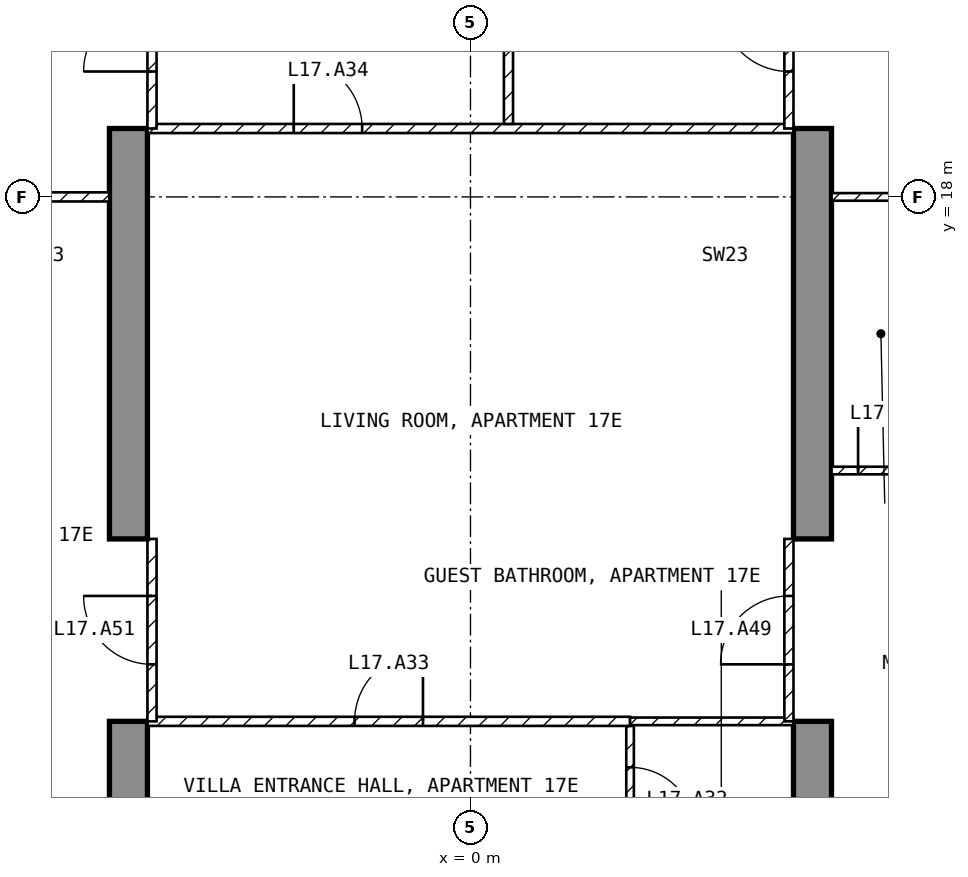
"""IFC4 building model, lengths in metres.
Left out: names, types, materials, properties, quantities, classifications, styles, units other than length and angle.
Written with IfcOpenShell. Run it as: python <this file> out.ifc"""

import sys

from ifc_helpers import new_model, si_unit, direction, frame, frame_2d, origin, place, context, subcontext, project, spatial, polyline, rectangle, outline, extrude, element, fill, save


model = new_model("IFC4")
c1 = context("Model", 3, precision=1e-05, world=origin(), true_north=direction((0.0, 1.0)))
c2 = subcontext(c1, "Body", "Model", "MODEL_VIEW")
j1 = project(units=[si_unit("LENGTHUNIT", "METRE"), si_unit("PLANEANGLEUNIT", "RADIAN")], contexts=[c1])
p1 = place(None, origin())
s1 = spatial("IfcSite", under=j1, at=p1, CompositionType="ELEMENT")
p2 = place(p1, origin())
s2 = spatial("IfcBuilding", under=s1, at=p2, CompositionType="ELEMENT")
p3 = place(p2, frame((0.0, 0.0, 78.5)))
s3 = spatial("IfcBuildingStorey", under=s2, at=p3, CompositionType="ELEMENT", Elevation=78.5)
for number, where, z_axis, x_axis in (
    (1, (-4.75, 9.0, -0.25), (1.0, 0.0, 0.0), (0.0, 1.0, 0.0)),
    (2, (4.25, 9.0, -0.25), (1.0, 0.0, 0.0), (0.0, 1.0, 0.0)),
):
    element("IfcWall", number, at=place(p3, frame(where, z_axis=z_axis, x_axis=x_axis)), inside=s3, PredefinedType="SHEAR", context=c2, shape_type="SweptSolid", body=[
        extrude(outline(polyline([(0.0, 0.0), (2.1, 0.0), (2.1, 2.65), (4.5, 2.65), (4.5, 0.0), (9.9, 0.0), (9.9, 2.65), (12.3, 2.65), (12.3, 0.0), (16.45, 0.0), (16.45, 3.5), (0.0, 3.5), (0.0, 0.0)])), origin(), (0.0, 0.0, 1.0), 0.5),
    ])
p4 = place(p3, frame((2.1, 11.04, 0.0), z_axis=(0.0, 0.0, 1.0), x_axis=(0.0, -1.0, 0.0)))
e3 = element("IfcWall", 3, at=p4, inside=s3, PredefinedType="PARTITIONING", context=c2, shape_type="SweptSolid", body=[
    extrude(rectangle(XDim=1.94, YDim=0.1, at=frame_2d((0.97, 0.0))), origin(), (0.0, 0.0, 1.0), 3.25),
])
p5 = place(p4, frame((0.545, 0.0, 0.0)))
e4 = element("IfcOpeningElement", 4, at=p5, cuts=e3, PredefinedType="OPENING", context=c2, shape_type="SweptSolid", body=[
    extrude(rectangle(XDim=0.85, YDim=2.1, at=frame_2d((0.425, 1.05))), frame((0.0, 0.06, 0.0), z_axis=(0.0, -1.0, 0.0), x_axis=(1.0, 0.0, 0.0)), (0.0, 0.0, 1.0), 0.12),
])
p6 = place(p3, frame((-4.25, 11.1, 0.0), z_axis=(0.0, 0.0, 1.0), x_axis=(1.0, 0.0, 0.0)))
e5 = element("IfcWall", 5, at=p6, inside=s3, PredefinedType="PARTITIONING", context=c2, shape_type="SweptSolid", body=[
    extrude(rectangle(XDim=6.35, YDim=0.12, at=frame_2d((3.175, 0.0))), origin(), (0.0, 0.0, 1.0), 3.25),
])
p7 = place(p6, frame((2.725, 0.0, 0.0)))
e6 = element("IfcOpeningElement", 6, at=p7, cuts=e5, PredefinedType="OPENING", context=c2, shape_type="SweptSolid", body=[
    extrude(rectangle(XDim=0.9, YDim=2.1, at=frame_2d((0.45, 1.05))), frame((0.0, 0.07, 0.0), z_axis=(0.0, -1.0, 0.0), x_axis=(1.0, 0.0, 0.0)), (0.0, 0.0, 1.0), 0.14),
])
p8 = place(p3, frame((2.1, 11.1, 0.0), z_axis=(0.0, 0.0, 1.0), x_axis=(1.0, 0.0, 0.0)))
e7 = element("IfcWall", 7, at=p8, inside=s3, PredefinedType="PARTITIONING", context=c2, shape_type="SweptSolid", body=[
    extrude(rectangle(XDim=2.15, YDim=0.1, at=frame_2d((1.075, 0.0))), origin(), (0.0, 0.0, 1.0), 3.25),
])
p9 = place(p3, frame((-4.25, 18.9, 0.0), z_axis=(0.0, 0.0, 1.0), x_axis=(1.0, 0.0, 0.0)))
e8 = element("IfcWall", 8, at=p9, inside=s3, PredefinedType="PARTITIONING", context=c2, shape_type="SweptSolid", body=[
    extrude(rectangle(XDim=8.5, YDim=0.12, at=frame_2d((4.25, 0.0))), origin(), (0.0, 0.0, 1.0), 3.25),
])
p10 = place(p9, frame((1.925, 0.0, 0.0)))
e9 = element("IfcOpeningElement", 9, at=p10, cuts=e8, PredefinedType="OPENING", context=c2, shape_type="SweptSolid", body=[
    extrude(rectangle(XDim=0.9, YDim=2.1, at=frame_2d((0.45, 1.05))), frame((0.0, 0.07, 0.0), z_axis=(0.0, -1.0, 0.0), x_axis=(1.0, 0.0, 0.0)), (0.0, 0.0, 1.0), 0.14),
])
p11 = place(p3, frame((0.5, 23.34, 0.0), z_axis=(0.0, 0.0, 1.0), x_axis=(0.0, -1.0, 0.0)))
e10 = element("IfcWall", 10, at=p11, inside=s3, PredefinedType="PARTITIONING", context=c2, shape_type="SweptSolid", body=[
    extrude(rectangle(XDim=4.38, YDim=0.12, at=frame_2d((2.19, 0.0))), origin(), (0.0, 0.0, 1.0), 3.25),
])
p12 = place(p11, frame((1.74, 0.0, 0.0)))
e11 = element("IfcOpeningElement", 11, at=p12, cuts=e10, PredefinedType="OPENING", context=c2, shape_type="SweptSolid", body=[
    extrude(rectangle(XDim=0.9, YDim=2.1, at=frame_2d((0.45, 1.05))), frame((0.0, 0.07, 0.0), z_axis=(0.0, -1.0, 0.0), x_axis=(1.0, 0.0, 0.0)), (0.0, 0.0, 1.0), 0.14),
])
p13 = place(p3, frame((4.75, 14.4, 0.0), z_axis=(0.0, 0.0, 1.0), x_axis=(1.0, 0.0, 0.0)))
e12 = element("IfcWall", 12, at=p13, inside=s3, PredefinedType="PARTITIONING", context=c2, shape_type="SweptSolid", body=[
    extrude(rectangle(XDim=1.6, YDim=0.1, at=frame_2d((0.8, 0.0))), origin(), (0.0, 0.0, 1.0), 3.25),
])
p14 = place(p13, frame((0.35, 0.0, 0.0)))
e13 = element("IfcOpeningElement", 13, at=p14, cuts=e12, PredefinedType="OPENING", context=c2, shape_type="SweptSolid", body=[
    extrude(rectangle(XDim=0.85, YDim=2.1, at=frame_2d((0.425, 1.05))), frame((0.0, 0.06, 0.0), z_axis=(0.0, -1.0, 0.0), x_axis=(1.0, 0.0, 0.0)), (0.0, 0.0, 1.0), 0.12),
])
p15 = place(p3, frame((4.75, 18.0, 0.0), z_axis=(0.0, 0.0, 1.0), x_axis=(1.0, 0.0, 0.0)))
e14 = element("IfcWall", 14, at=p15, inside=s3, PredefinedType="PARTITIONING", context=c2, shape_type="SweptSolid", body=[
    extrude(rectangle(XDim=1.55, YDim=0.1, at=frame_2d((0.775, 0.0))), origin(), (0.0, 0.0, 1.0), 2.346),
])
p16 = place(p3, frame((-7.45, 18.0, 0.0), z_axis=(0.0, 0.0, 1.0), x_axis=(1.0, 0.0, 0.0)))
e15 = element("IfcWall", 15, at=p16, inside=s3, PredefinedType="PARTITIONING", context=c2, shape_type="SweptSolid", body=[
    extrude(rectangle(XDim=2.7, YDim=0.12, at=frame_2d((1.35, 0.0))), origin(), (0.0, 0.0, 1.0), 2.346),
])
p17 = place(p3, frame((4.19, 11.1, 0.0), z_axis=(0.0, 0.0, 1.0), x_axis=(0.0, 1.0, 0.0)))
e16 = element("IfcWall", 16, at=p17, inside=s3, PredefinedType="PARTITIONING", context=c2, shape_type="SweptSolid", body=[
    extrude(rectangle(XDim=2.4, YDim=0.12, at=frame_2d((1.2, 0.0))), origin(), (0.0, 0.0, 1.0), 2.4),
])
p18 = place(p17, frame((0.75, 0.0, 0.0)))
e17 = element("IfcOpeningElement", 17, at=p18, cuts=e16, PredefinedType="OPENING", context=c2, shape_type="SweptSolid", body=[
    extrude(rectangle(XDim=0.9, YDim=2.1, at=frame_2d((0.45, 1.05))), frame((0.0, 0.07, 0.0), z_axis=(0.0, -1.0, 0.0), x_axis=(1.0, 0.0, 0.0)), (0.0, 0.0, 1.0), 0.14),
])
p19 = place(p3, frame((4.19, 18.9, 0.0), z_axis=(0.0, 0.0, 1.0), x_axis=(0.0, 1.0, 0.0)))
e18 = element("IfcWall", 18, at=p19, inside=s3, PredefinedType="PARTITIONING", context=c2, shape_type="SweptSolid", body=[
    extrude(rectangle(XDim=2.4, YDim=0.12, at=frame_2d((1.2, 0.0))), origin(), (0.0, 0.0, 1.0), 2.4),
])
p20 = place(p19, frame((0.75, 0.0, 0.0)))
e19 = element("IfcOpeningElement", 19, at=p20, cuts=e18, PredefinedType="OPENING", context=c2, shape_type="SweptSolid", body=[
    extrude(rectangle(XDim=0.9, YDim=2.1, at=frame_2d((0.45, 1.05))), frame((0.0, 0.07, 0.0), z_axis=(0.0, -1.0, 0.0), x_axis=(1.0, 0.0, 0.0)), (0.0, 0.0, 1.0), 0.14),
])
p21 = place(p3, frame((-4.19, 11.1, 0.0), z_axis=(0.0, 0.0, 1.0), x_axis=(0.0, 1.0, 0.0)))
e20 = element("IfcWall", 20, at=p21, inside=s3, PredefinedType="PARTITIONING", context=c2, shape_type="SweptSolid", body=[
    extrude(rectangle(XDim=2.4, YDim=0.12, at=frame_2d((1.2, 0.0))), origin(), (0.0, 0.0, 1.0), 2.4),
])
p22 = place(p21, frame((0.75, 0.0, 0.0)))
e21 = element("IfcOpeningElement", 21, at=p22, cuts=e20, PredefinedType="OPENING", context=c2, shape_type="SweptSolid", body=[
    extrude(rectangle(XDim=0.9, YDim=2.1, at=frame_2d((0.45, 1.05))), frame((0.0, 0.07, 0.0), z_axis=(0.0, -1.0, 0.0), x_axis=(1.0, 0.0, 0.0)), (0.0, 0.0, 1.0), 0.14),
])
p23 = place(p3, frame((-4.19, 18.9, 0.0), z_axis=(0.0, 0.0, 1.0), x_axis=(0.0, 1.0, 0.0)))
e22 = element("IfcWall", 22, at=p23, inside=s3, PredefinedType="PARTITIONING", context=c2, shape_type="SweptSolid", body=[
    extrude(rectangle(XDim=2.4, YDim=0.12, at=frame_2d((1.2, 0.0))), origin(), (0.0, 0.0, 1.0), 2.4),
])
p24 = place(p23, frame((0.75, 0.0, 0.0)))
e23 = element("IfcOpeningElement", 23, at=p24, cuts=e22, PredefinedType="OPENING", context=c2, shape_type="SweptSolid", body=[
    extrude(rectangle(XDim=0.9, YDim=2.1, at=frame_2d((0.45, 1.05))), frame((0.0, 0.07, 0.0), z_axis=(0.0, -1.0, 0.0), x_axis=(1.0, 0.0, 0.0)), (0.0, 0.0, 1.0), 0.14),
])
p25 = place(p5, origin())
e24 = element("IfcDoor", 24, at=p25, inside=s3, OperationType="SINGLE_SWING_RIGHT", PredefinedType="DOOR", context=c2, shape_type="SweptSolid", body=[
    extrude(rectangle(XDim=0.85, YDim=2.1, at=frame_2d((0.425, 1.05))), frame((0.0, 0.025, 0.0), z_axis=(0.0, -1.0, 0.0), x_axis=(1.0, 0.0, 0.0)), (0.0, 0.0, 1.0), 0.05),
])
fill(e4, e24)
p26 = place(p7, origin())
e25 = element("IfcDoor", 25, at=p26, inside=s3, OperationType="SINGLE_SWING_RIGHT", PredefinedType="DOOR", context=c2, shape_type="SweptSolid", body=[
    extrude(rectangle(XDim=0.9, YDim=2.1, at=frame_2d((0.45, 1.05))), frame((0.0, 0.025, 0.0), z_axis=(0.0, -1.0, 0.0), x_axis=(1.0, 0.0, 0.0)), (0.0, 0.0, 1.0), 0.05),
])
fill(e6, e25)
p27 = place(p10, origin())
e26 = element("IfcDoor", 26, at=p27, inside=s3, OperationType="SINGLE_SWING_LEFT", PredefinedType="DOOR", context=c2, shape_type="SweptSolid", body=[
    extrude(rectangle(XDim=0.9, YDim=2.1, at=frame_2d((0.45, 1.05))), frame((0.0, 0.025, 0.0), z_axis=(0.0, -1.0, 0.0), x_axis=(1.0, 0.0, 0.0)), (0.0, 0.0, 1.0), 0.05),
])
fill(e9, e26)
p28 = place(p14, origin())
e27 = element("IfcDoor", 27, at=p28, inside=s3, OperationType="SINGLE_SWING_LEFT", PredefinedType="DOOR", context=c2, shape_type="SweptSolid", body=[
    extrude(rectangle(XDim=0.85, YDim=2.1, at=frame_2d((0.425, 1.05))), frame((0.0, 0.025, 0.0), z_axis=(0.0, -1.0, 0.0), x_axis=(1.0, 0.0, 0.0)), (0.0, 0.0, 1.0), 0.05),
])
fill(e13, e27)
p29 = place(p18, origin())
e28 = element("IfcDoor", 28, at=p29, inside=s3, OperationType="SINGLE_SWING_LEFT", PredefinedType="DOOR", context=c2, shape_type="SweptSolid", body=[
    extrude(rectangle(XDim=0.9, YDim=2.1, at=frame_2d((0.45, 1.05))), frame((0.0, 0.025, 0.0), z_axis=(0.0, -1.0, 0.0), x_axis=(1.0, 0.0, 0.0)), (0.0, 0.0, 1.0), 0.05),
])
fill(e17, e28)
p30 = place(p20, origin())
e29 = element("IfcDoor", 29, at=p30, inside=s3, OperationType="SINGLE_SWING_RIGHT", PredefinedType="DOOR", context=c2, shape_type="SweptSolid", body=[
    extrude(rectangle(XDim=0.9, YDim=2.1, at=frame_2d((0.45, 1.05))), frame((0.0, 0.025, 0.0), z_axis=(0.0, -1.0, 0.0), x_axis=(1.0, 0.0, 0.0)), (0.0, 0.0, 1.0), 0.05),
])
fill(e19, e29)
p31 = place(p22, origin())
e30 = element("IfcDoor", 30, at=p31, inside=s3, OperationType="SINGLE_SWING_RIGHT", PredefinedType="DOOR", context=c2, shape_type="SweptSolid", body=[
    extrude(rectangle(XDim=0.9, YDim=2.1, at=frame_2d((0.45, 1.05))), frame((0.0, 0.025, 0.0), z_axis=(0.0, -1.0, 0.0), x_axis=(1.0, 0.0, 0.0)), (0.0, 0.0, 1.0), 0.05),
])
fill(e21, e30)
p32 = place(p24, origin())
e31 = element("IfcDoor", 31, at=p32, inside=s3, OperationType="SINGLE_SWING_LEFT", PredefinedType="DOOR", context=c2, shape_type="SweptSolid", body=[
    extrude(rectangle(XDim=0.9, YDim=2.1, at=frame_2d((0.45, 1.05))), frame((0.0, 0.025, 0.0), z_axis=(0.0, -1.0, 0.0), x_axis=(1.0, 0.0, 0.0)), (0.0, 0.0, 1.0), 0.05),
])
fill(e23, e31)
save(model, sys.argv[1])
